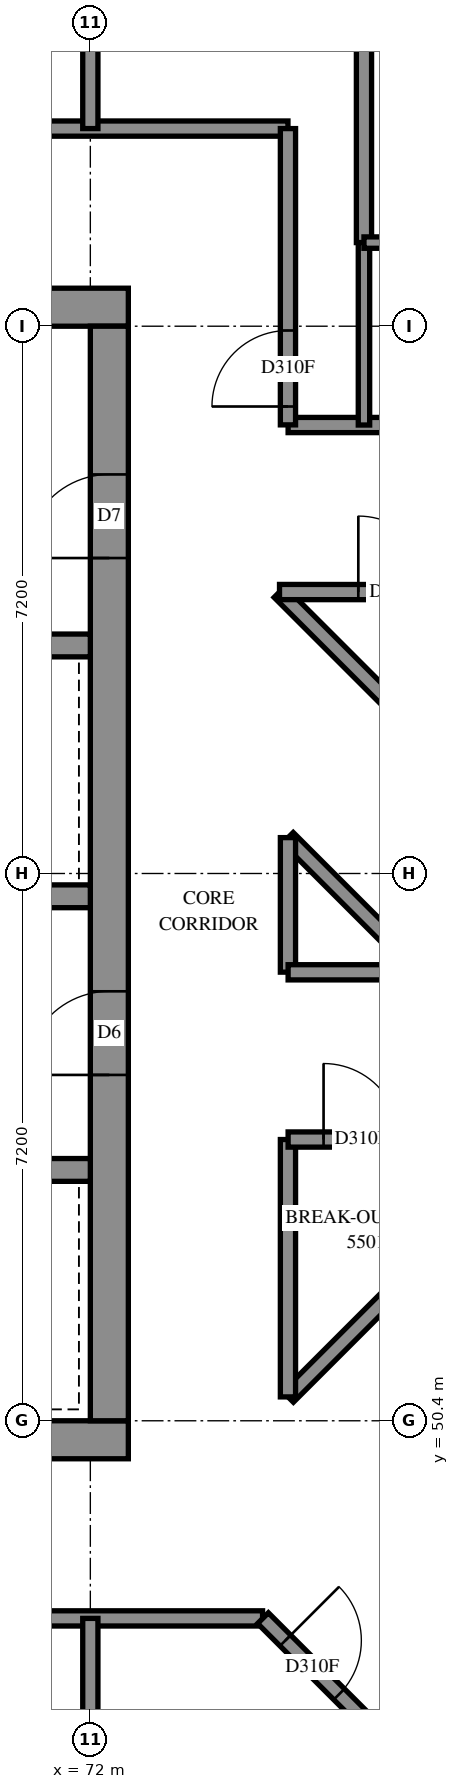
"""IFC4 building model, lengths in metres.
Left out: names, types, materials, properties, quantities, classifications, styles, units other than length and angle.
Written with IfcOpenShell. Run it as: python <this file> out.ifc"""

import sys

from ifc_helpers import new_model, si_unit, direction, frame, frame_2d, origin, place, context, subcontext, project, spatial, rectangle, extrude, element, fill, save


model = new_model("IFC4")
c1 = context("Model", 3, precision=1e-05, world=origin(), true_north=direction((0.0, 1.0)))
c2 = subcontext(c1, "Body", "Model", "MODEL_VIEW")
j1 = project(units=[si_unit("LENGTHUNIT", "METRE"), si_unit("PLANEANGLEUNIT", "RADIAN")], contexts=[c1])
p1 = place(None, origin())
s1 = spatial("IfcSite", under=j1, at=p1, CompositionType="ELEMENT")
p2 = place(p1, origin())
s2 = spatial("IfcBuilding", under=s1, at=p2, CompositionType="ELEMENT")
p3 = place(p2, frame((0.0, 0.0, 203.2)))
s3 = spatial("IfcBuildingStorey", under=s2, at=p3, CompositionType="ELEMENT", Elevation=203.2)
p4 = place(p3, frame((57.1, 50.15, -0.3), z_axis=(0.0, 0.0, 1.0), x_axis=(1.0, 0.0, 0.0)))
e1 = element("IfcWall", 1, at=p4, inside=s3, PredefinedType="SHEAR", context=c2, shape_type="SweptSolid", body=[
    extrude(rectangle(XDim=15.4, YDim=0.5, at=frame_2d((7.7, 0.0))), origin(), (0.0, 0.0, 1.0), 2.7),
])
p5 = place(p3, frame((57.1, 65.05, -0.3), z_axis=(0.0, 0.0, 1.0), x_axis=(1.0, 0.0, 0.0)))
e2 = element("IfcWall", 2, at=p5, inside=s3, PredefinedType="SHEAR", context=c2, shape_type="SweptSolid", body=[
    extrude(rectangle(XDim=15.4, YDim=0.5, at=frame_2d((7.7, 0.0))), origin(), (0.0, 0.0, 1.0), 2.7),
])
p6 = place(p5, frame((10.5, 0.0, 0.3)))
e3 = element("IfcOpeningElement", 3, at=p6, cuts=e2, PredefinedType="OPENING", context=c2, shape_type="SweptSolid", body=[
    extrude(rectangle(XDim=0.8, YDim=2.1, at=frame_2d((0.4, 1.05))), frame((0.0, 0.26, 0.0), z_axis=(0.0, -1.0, 0.0), x_axis=(1.0, 0.0, 0.0)), (0.0, 0.0, 1.0), 0.52),
])
p7 = place(p3, frame((72.25, 50.4, -0.3), z_axis=(0.0, 0.0, 1.0), x_axis=(0.0, 1.0, 0.0)))
e4 = element("IfcWall", 4, at=p7, inside=s3, PredefinedType="SHEAR", context=c2, shape_type="SweptSolid", body=[
    extrude(rectangle(XDim=14.4, YDim=0.5, at=frame_2d((7.2, 0.0))), origin(), (0.0, 0.0, 1.0), 2.7),
])
p8 = place(p7, frame((4.55, 0.0, 0.3)))
e5 = element("IfcOpeningElement", 5, at=p8, cuts=e4, PredefinedType="OPENING", context=c2, shape_type="SweptSolid", body=[
    extrude(rectangle(XDim=1.1, YDim=2.1, at=frame_2d((0.55, 1.05))), frame((0.0, 0.26, 0.0), z_axis=(0.0, -1.0, 0.0), x_axis=(1.0, 0.0, 0.0)), (0.0, 0.0, 1.0), 0.52),
])
p9 = place(p7, frame((11.35, 0.0, 0.3)))
e6 = element("IfcOpeningElement", 6, at=p9, cuts=e4, PredefinedType="OPENING", context=c2, shape_type="SweptSolid", body=[
    extrude(rectangle(XDim=1.1, YDim=2.1, at=frame_2d((0.55, 1.05))), frame((0.0, 0.26, 0.0), z_axis=(0.0, -1.0, 0.0), x_axis=(1.0, 0.0, 0.0)), (0.0, 0.0, 1.0), 0.52),
])
p10 = place(p3, frame((57.6, 53.7, 0.0), z_axis=(0.0, 0.0, 1.0), x_axis=(1.0, 0.0, 0.0)))
e7 = element("IfcWall", 7, at=p10, inside=s3, PredefinedType="SOLIDWALL", context=c2, shape_type="SweptSolid", body=[
    extrude(rectangle(XDim=14.4, YDim=0.3, at=frame_2d((7.2, 0.0))), origin(), (0.0, 0.0, 1.0), 3.1),
])
p11 = place(p10, frame((1.35, 0.0, 0.0)))
e8 = element("IfcOpeningElement", 8, at=p11, cuts=e7, PredefinedType="OPENING", context=c2, shape_type="SweptSolid", body=[
    extrude(rectangle(XDim=0.9, YDim=2.1, at=frame_2d((0.45, 1.05))), frame((0.0, 0.16, 0.0), z_axis=(0.0, -1.0, 0.0), x_axis=(1.0, 0.0, 0.0)), (0.0, 0.0, 1.0), 0.32),
])
p12 = place(p10, frame((4.95, 0.0, 0.0)))
e9 = element("IfcOpeningElement", 9, at=p12, cuts=e7, PredefinedType="OPENING", context=c2, shape_type="SweptSolid", body=[
    extrude(rectangle(XDim=0.9, YDim=2.1, at=frame_2d((0.45, 1.05))), frame((0.0, 0.16, 0.0), z_axis=(0.0, -1.0, 0.0), x_axis=(1.0, 0.0, 0.0)), (0.0, 0.0, 1.0), 0.32),
])
p13 = place(p10, frame((8.55, 0.0, 0.0)))
e10 = element("IfcOpeningElement", 10, at=p13, cuts=e7, PredefinedType="OPENING", context=c2, shape_type="SweptSolid", body=[
    extrude(rectangle(XDim=0.9, YDim=2.1, at=frame_2d((0.45, 1.05))), frame((0.0, 0.16, 0.0), z_axis=(0.0, -1.0, 0.0), x_axis=(1.0, 0.0, 0.0)), (0.0, 0.0, 1.0), 0.32),
])
p14 = place(p10, frame((12.05, 0.0, 0.0)))
e11 = element("IfcOpeningElement", 11, at=p14, cuts=e7, PredefinedType="OPENING", context=c2, shape_type="SweptSolid", body=[
    extrude(rectangle(XDim=1.1, YDim=2.1, at=frame_2d((0.55, 1.05))), frame((0.0, 0.16, 0.0), z_axis=(0.0, -1.0, 0.0), x_axis=(1.0, 0.0, 0.0)), (0.0, 0.0, 1.0), 0.32),
])
p15 = place(p3, frame((57.6, 57.3, 0.0), z_axis=(0.0, 0.0, 1.0), x_axis=(1.0, 0.0, 0.0)))
e12 = element("IfcWall", 12, at=p15, inside=s3, PredefinedType="SOLIDWALL", context=c2, shape_type="SweptSolid", body=[
    extrude(rectangle(XDim=14.4, YDim=0.3, at=frame_2d((7.2, 0.0))), origin(), (0.0, 0.0, 1.0), 3.1),
])
p16 = place(p15, frame((1.25, 0.0, 0.0)))
e13 = element("IfcOpeningElement", 13, at=p16, cuts=e12, PredefinedType="OPENING", context=c2, shape_type="SweptSolid", body=[
    extrude(rectangle(XDim=1.1, YDim=2.1, at=frame_2d((0.55, 1.05))), frame((0.0, 0.16, 0.0), z_axis=(0.0, -1.0, 0.0), x_axis=(1.0, 0.0, 0.0)), (0.0, 0.0, 1.0), 0.32),
])
p17 = place(p15, frame((4.85, 0.0, 0.0)))
e14 = element("IfcOpeningElement", 14, at=p17, cuts=e12, PredefinedType="OPENING", context=c2, shape_type="SweptSolid", body=[
    extrude(rectangle(XDim=1.1, YDim=2.1, at=frame_2d((0.55, 1.05))), frame((0.0, 0.16, 0.0), z_axis=(0.0, -1.0, 0.0), x_axis=(1.0, 0.0, 0.0)), (0.0, 0.0, 1.0), 0.32),
])
p18 = place(p15, frame((8.45, 0.0, 0.0)))
e15 = element("IfcOpeningElement", 15, at=p18, cuts=e12, PredefinedType="OPENING", context=c2, shape_type="SweptSolid", body=[
    extrude(rectangle(XDim=1.1, YDim=2.1, at=frame_2d((0.55, 1.05))), frame((0.0, 0.16, 0.0), z_axis=(0.0, -1.0, 0.0), x_axis=(1.0, 0.0, 0.0)), (0.0, 0.0, 1.0), 0.32),
])
p19 = place(p15, frame((12.05, 0.0, 0.0)))
e16 = element("IfcOpeningElement", 16, at=p19, cuts=e12, PredefinedType="OPENING", context=c2, shape_type="SweptSolid", body=[
    extrude(rectangle(XDim=1.1, YDim=2.1, at=frame_2d((0.55, 1.05))), frame((0.0, 0.16, 0.0), z_axis=(0.0, -1.0, 0.0), x_axis=(1.0, 0.0, 0.0)), (0.0, 0.0, 1.0), 0.32),
])
p20 = place(p3, frame((64.8, 60.6, 0.0), z_axis=(0.0, 0.0, 1.0), x_axis=(1.0, 0.0, 0.0)))
e17 = element("IfcWall", 17, at=p20, inside=s3, PredefinedType="SOLIDWALL", context=c2, shape_type="SweptSolid", body=[
    extrude(rectangle(XDim=7.2, YDim=0.3, at=frame_2d((3.6, 0.0))), origin(), (0.0, 0.0, 1.0), 3.1),
])
p21 = place(p3, frame((55.0, 67.4, 0.0), z_axis=(0.0, 0.0, 1.0), x_axis=(1.0, 0.0, 0.0)))
e18 = element("IfcWall", 18, at=p21, inside=s3, PredefinedType="PARTITIONING", context=c2, shape_type="SweptSolid", body=[
    extrude(rectangle(XDim=19.6, YDim=0.2, at=frame_2d((9.8, 0.0))), origin(), (0.0, 0.0, 1.0), 3.1),
])
p22 = place(p21, frame((6.499, 0.0, 0.0)))
e19 = element("IfcOpeningElement", 19, at=p22, cuts=e18, PredefinedType="OPENING", context=c2, shape_type="SweptSolid", body=[
    extrude(rectangle(XDim=0.9, YDim=2.1, at=frame_2d((0.45, 1.05))), frame((0.0, 0.11, 0.0), z_axis=(0.0, -1.0, 0.0), x_axis=(1.0, 0.0, 0.0)), (0.0, 0.0, 1.0), 0.22),
])
p23 = place(p21, frame((14.001, 0.0, 0.0)))
e20 = element("IfcOpeningElement", 20, at=p23, cuts=e18, PredefinedType="OPENING", context=c2, shape_type="SweptSolid", body=[
    extrude(rectangle(XDim=0.9, YDim=2.1, at=frame_2d((0.45, 1.05))), frame((0.0, 0.11, 0.0), z_axis=(0.0, -1.0, 0.0), x_axis=(1.0, 0.0, 0.0)), (0.0, 0.0, 1.0), 0.22),
])
p24 = place(p3, frame((55.0, 47.8, 0.0), z_axis=(0.0, 0.0, 1.0), x_axis=(1.0, 0.0, 0.0)))
e21 = element("IfcWall", 21, at=p24, inside=s3, PredefinedType="PARTITIONING", context=c2, shape_type="SweptSolid", body=[
    extrude(rectangle(XDim=19.266, YDim=0.2, at=frame_2d((9.633, 0.0))), origin(), (0.0, 0.0, 1.0), 3.1),
])
p25 = place(p24, frame((4.9, 0.0, 0.0)))
e22 = element("IfcOpeningElement", 22, at=p25, cuts=e21, PredefinedType="OPENING", context=c2, shape_type="SweptSolid", body=[
    extrude(rectangle(XDim=0.9, YDim=2.1, at=frame_2d((0.45, 1.05))), frame((0.0, 0.11, 0.0), z_axis=(0.0, -1.0, 0.0), x_axis=(1.0, 0.0, 0.0)), (0.0, 0.0, 1.0), 0.22),
])
p26 = place(p24, frame((6.6, 0.0, 0.0)))
e23 = element("IfcOpeningElement", 23, at=p26, cuts=e21, PredefinedType="OPENING", context=c2, shape_type="SweptSolid", body=[
    extrude(rectangle(XDim=0.9, YDim=2.1, at=frame_2d((0.45, 1.05))), frame((0.0, 0.11, 0.0), z_axis=(0.0, -1.0, 0.0), x_axis=(1.0, 0.0, 0.0)), (0.0, 0.0, 1.0), 0.22),
])
p27 = place(p24, frame((13.743, 0.0, 0.0)))
e24 = element("IfcOpeningElement", 24, at=p27, cuts=e21, PredefinedType="OPENING", context=c2, shape_type="SweptSolid", body=[
    extrude(rectangle(XDim=0.9, YDim=2.1, at=frame_2d((0.45, 1.05))), frame((0.0, 0.11, 0.0), z_axis=(0.0, -1.0, 0.0), x_axis=(1.0, 0.0, 0.0)), (0.0, 0.0, 1.0), 0.22),
])
p28 = place(p3, frame((75.6, 65.9, 0.0), z_axis=(0.0, 0.0, 1.0), x_axis=(0.0, 1.0, 0.0)))
e25 = element("IfcWall", 25, at=p28, inside=s3, PredefinedType="PARTITIONING", context=c2, shape_type="SweptSolid", body=[
    extrude(rectangle(XDim=6.877, YDim=0.2, at=frame_2d((3.439, 0.0))), origin(), (0.0, 0.0, 1.0), 3.1),
])
p29 = place(p3, frame((74.489, 61.303, 0.0), z_axis=(0.0, 0.0, 1.0), x_axis=(0.7071892763, -0.7070242765, 0.0)))
e26 = element("IfcWall", 26, at=p29, inside=s3, PredefinedType="PARTITIONING", context=c2, shape_type="SweptSolid", body=[
    extrude(rectangle(XDim=6.667, YDim=0.2, at=frame_2d((3.333, 0.0))), origin(), (0.0, 0.0, 1.0), 3.1),
])
p30 = place(p3, frame((74.601, 50.715, 0.0), z_axis=(0.0, 0.0, 1.0), x_axis=(0.7071067812, 0.7071067812, 0.0)))
e27 = element("IfcWall", 27, at=p30, inside=s3, PredefinedType="PARTITIONING", context=c2, shape_type="SweptSolid", body=[
    extrude(rectangle(XDim=4.786, YDim=0.2, at=frame_2d((2.393, 0.0))), origin(), (0.0, 0.0, 1.0), 3.1),
])
p31 = place(p3, frame((74.489, 61.303, 0.0), z_axis=(0.0, 0.0, 1.0), x_axis=(0.9999998105, -0.0006155543, 0.0)))
e28 = element("IfcWall", 28, at=p31, inside=s3, PredefinedType="PARTITIONING", context=c2, shape_type="SweptSolid", body=[
    extrude(rectangle(XDim=4.711, YDim=0.2, at=frame_2d((2.356, 0.0))), origin(), (0.0, 0.0, 1.0), 3.1),
])
p32 = place(p31, frame((1.037, 0.0, 0.0)))
e29 = element("IfcOpeningElement", 29, at=p32, cuts=e28, PredefinedType="OPENING", context=c2, shape_type="SweptSolid", body=[
    extrude(rectangle(XDim=1.0, YDim=2.1, at=frame_2d((0.5, 1.05))), frame((0.0, 0.11, 0.0), z_axis=(0.0, -1.0, 0.0), x_axis=(1.0, 0.0, 0.0)), (0.0, 0.0, 1.0), 0.22),
])
p33 = place(p3, frame((74.272, 47.803, 0.0), z_axis=(0.0, 0.0, 1.0), x_axis=(0.7071067812, -0.7071067812, 0.0)))
e30 = element("IfcWall", 30, at=p33, inside=s3, PredefinedType="PARTITIONING", context=c2, shape_type="SweptSolid", body=[
    extrude(rectangle(XDim=4.641, YDim=0.2, at=frame_2d((2.321, 0.0))), origin(), (0.0, 0.0, 1.0), 3.1),
])
p34 = place(p33, frame((0.416, 0.0, 0.0)))
e31 = element("IfcOpeningElement", 31, at=p34, cuts=e30, PredefinedType="OPENING", context=c2, shape_type="SweptSolid", body=[
    extrude(rectangle(XDim=1.0, YDim=2.1, at=frame_2d((0.5, 1.05))), frame((0.0, 0.11, 0.0), z_axis=(0.0, -1.0, 0.0), x_axis=(1.0, 0.0, 0.0)), (0.0, 0.0, 1.0), 0.22),
])
p35 = place(p3, frame((74.602, 63.5, 0.0), z_axis=(0.0, 0.0, 1.0), x_axis=(1.0, 0.0, 0.0)))
e32 = element("IfcWall", 32, at=p35, inside=s3, PredefinedType="PARTITIONING", context=c2, shape_type="SweptSolid", body=[
    extrude(rectangle(XDim=4.598, YDim=0.2, at=frame_2d((2.299, 0.0))), origin(), (0.0, 0.0, 1.0), 3.1),
])
p36 = place(p35, frame((3.298, 0.0, 0.0)))
e33 = element("IfcOpeningElement", 33, at=p36, cuts=e32, PredefinedType="OPENING", context=c2, shape_type="SweptSolid", body=[
    extrude(rectangle(XDim=0.9, YDim=2.1, at=frame_2d((0.45, 1.05))), frame((0.0, 0.11, 0.0), z_axis=(0.0, -1.0, 0.0), x_axis=(1.0, 0.0, 0.0)), (0.0, 0.0, 1.0), 0.22),
])
p37 = place(p3, frame((72.0, 43.6, 0.0), z_axis=(0.0, 0.0, 1.0), x_axis=(0.0, 1.0, 0.0)))
e34 = element("IfcWall", 34, at=p37, inside=s3, PredefinedType="PARTITIONING", context=c2, shape_type="SweptSolid", body=[
    extrude(rectangle(XDim=4.2, YDim=0.2, at=frame_2d((2.1, 0.0))), origin(), (0.0, 0.0, 1.0), 3.1),
])
p38 = place(p3, frame((72.0, 67.4, 0.0), z_axis=(0.0, 0.0, 1.0), x_axis=(0.0, 1.0, 0.0)))
e35 = element("IfcWall", 35, at=p38, inside=s3, PredefinedType="PARTITIONING", context=c2, shape_type="SweptSolid", body=[
    extrude(rectangle(XDim=4.096, YDim=0.2, at=frame_2d((2.048, 0.0))), origin(), (0.0, 0.0, 1.0), 3.1),
])
p39 = place(p3, frame((74.6, 63.502, 0.0), z_axis=(0.0, 0.0, 1.0), x_axis=(0.0, 1.0, 0.0)))
e36 = element("IfcWall", 36, at=p39, inside=s3, PredefinedType="PARTITIONING", context=c2, shape_type="SweptSolid", body=[
    extrude(rectangle(XDim=3.898, YDim=0.2, at=frame_2d((1.949, 0.0))), origin(), (0.0, 0.0, 1.0), 3.1),
])
p40 = place(p39, frame((0.242, 0.0, 0.0)))
e37 = element("IfcOpeningElement", 37, at=p40, cuts=e36, PredefinedType="OPENING", context=c2, shape_type="SweptSolid", body=[
    extrude(rectangle(XDim=1.0, YDim=2.1, at=frame_2d((0.5, 1.05))), frame((0.0, 0.11, 0.0), z_axis=(0.0, -1.0, 0.0), x_axis=(1.0, 0.0, 0.0)), (0.0, 0.0, 1.0), 0.22),
])
p41 = place(p3, frame((74.6, 50.714, 0.0), z_axis=(0.0, 0.0, 1.0), x_axis=(0.0, 1.0, 0.0)))
e38 = element("IfcWall", 38, at=p41, inside=s3, PredefinedType="PARTITIONING", context=c2, shape_type="SweptSolid", body=[
    extrude(rectangle(XDim=3.386, YDim=0.2, at=frame_2d((1.693, 0.0))), origin(), (0.0, 0.0, 1.0), 3.1),
])
p42 = place(p3, frame((74.602, 54.1, 0.0), z_axis=(0.0, 0.0, 1.0), x_axis=(1.0, 0.0, 0.0)))
e39 = element("IfcWall", 39, at=p42, inside=s3, PredefinedType="PARTITIONING", context=c2, shape_type="SweptSolid", body=[
    extrude(rectangle(XDim=3.384, YDim=0.2, at=frame_2d((1.692, 0.0))), origin(), (0.0, 0.0, 1.0), 3.1),
])
p43 = place(p42, frame((0.467, 0.0, 0.0)))
e40 = element("IfcOpeningElement", 40, at=p43, cuts=e39, PredefinedType="OPENING", context=c2, shape_type="SweptSolid", body=[
    extrude(rectangle(XDim=1.0, YDim=2.1, at=frame_2d((0.5, 1.05))), frame((0.0, 0.11, 0.0), z_axis=(0.0, -1.0, 0.0), x_axis=(1.0, 0.0, 0.0)), (0.0, 0.0, 1.0), 0.22),
])
p44 = place(p3, frame((74.599, 58.069, 0.0), z_axis=(0.0, 0.0, 1.0), x_axis=(0.7071067812, -0.7071067812, 0.0)))
e41 = element("IfcWall", 41, at=p44, inside=s3, PredefinedType="PARTITIONING", context=c2, shape_type="SweptSolid", body=[
    extrude(rectangle(XDim=2.503, YDim=0.2, at=frame_2d((1.252, 0.0))), origin(), (0.0, 0.0, 1.0), 3.1),
])
p45 = place(p3, frame((75.6, 63.5, 0.0), z_axis=(0.0, 0.0, 1.0), x_axis=(0.0, 1.0, 0.0)))
e42 = element("IfcWall", 42, at=p45, inside=s3, PredefinedType="PARTITIONING", context=c2, shape_type="SweptSolid", body=[
    extrude(rectangle(XDim=2.4, YDim=0.15, at=frame_2d((1.2, 0.0))), origin(), (0.0, 0.0, 1.0), 3.1),
])
p46 = place(p3, frame((75.6, 65.9, 0.0), z_axis=(0.0, 0.0, 1.0), x_axis=(1.0, 0.0, 0.0)))
e43 = element("IfcWall", 43, at=p46, inside=s3, PredefinedType="PARTITIONING", context=c2, shape_type="SweptSolid", body=[
    extrude(rectangle(XDim=1.9, YDim=0.15, at=frame_2d((0.95, 0.0))), origin(), (0.0, 0.0, 1.0), 3.1),
])
p47 = place(p46, frame((0.502, 0.0, 0.0)))
e44 = element("IfcOpeningElement", 44, at=p47, cuts=e43, PredefinedType="OPENING", context=c2, shape_type="SweptSolid", body=[
    extrude(rectangle(XDim=0.8, YDim=2.1, at=frame_2d((0.4, 1.05))), frame((0.0, 0.085, 0.0), z_axis=(0.0, -1.0, 0.0), x_axis=(1.0, 0.0, 0.0)), (0.0, 0.0, 1.0), 0.17),
])
for number, where, z_axis, x_axis in (
    (45, (74.6, 56.302, 0.0), (0.0, 0.0, 1.0), (0.0, 1.0, 0.0)),
    (46, (74.602, 56.3, 0.0), (0.0, 0.0, 1.0), (1.0, 0.0, 0.0)),
):
    element("IfcWall", number, at=place(p3, frame(where, z_axis=z_axis, x_axis=x_axis)), inside=s3, PredefinedType="PARTITIONING", context=c2, shape_type="SweptSolid", body=[
        extrude(rectangle(XDim=1.77, YDim=0.2, at=frame_2d((0.885, 0.0))), origin(), (0.0, 0.0, 1.0), 3.1),
    ])
p48 = place(p8, origin())
e47 = element("IfcDoor", 47, at=p48, inside=s3, OperationType="DOUBLE_DOOR_SINGLE_SWING", PredefinedType="DOOR", context=c2, shape_type="SweptSolid", body=[
    extrude(rectangle(XDim=1.1, YDim=2.1, at=frame_2d((0.55, 1.05))), frame((0.0, 0.025, 0.0), z_axis=(0.0, -1.0, 0.0), x_axis=(1.0, 0.0, 0.0)), (0.0, 0.0, 1.0), 0.05),
])
fill(e5, e47)
p49 = place(p9, origin())
e48 = element("IfcDoor", 48, at=p49, inside=s3, OperationType="SINGLE_SWING_RIGHT", PredefinedType="DOOR", context=c2, shape_type="SweptSolid", body=[
    extrude(rectangle(XDim=1.1, YDim=2.1, at=frame_2d((0.55, 1.05))), frame((0.0, 0.025, 0.0), z_axis=(0.0, -1.0, 0.0), x_axis=(1.0, 0.0, 0.0)), (0.0, 0.0, 1.0), 0.05),
])
fill(e6, e48)
p50 = place(p43, origin())
e49 = element("IfcDoor", 49, at=p50, inside=s3, OperationType="SINGLE_SWING_RIGHT", PredefinedType="DOOR", context=c2, shape_type="SweptSolid", body=[
    extrude(rectangle(XDim=1.0, YDim=2.1, at=frame_2d((0.5, 1.05))), frame((0.0, 0.025, 0.0), z_axis=(0.0, -1.0, 0.0), x_axis=(1.0, 0.0, 0.0)), (0.0, 0.0, 1.0), 0.05),
])
fill(e40, e49)
p51 = place(p40, origin())
e50 = element("IfcDoor", 50, at=p51, inside=s3, OperationType="SINGLE_SWING_RIGHT", PredefinedType="DOOR", context=c2, shape_type="SweptSolid", body=[
    extrude(rectangle(XDim=1.0, YDim=2.1, at=frame_2d((0.5, 1.05))), frame((0.0, 0.025, 0.0), z_axis=(0.0, -1.0, 0.0), x_axis=(1.0, 0.0, 0.0)), (0.0, 0.0, 1.0), 0.05),
])
fill(e37, e50)
p52 = place(p32, origin())
e51 = element("IfcDoor", 51, at=p52, inside=s3, OperationType="SINGLE_SWING_RIGHT", PredefinedType="DOOR", context=c2, shape_type="SweptSolid", body=[
    extrude(rectangle(XDim=1.0, YDim=2.1, at=frame_2d((0.5, 1.05))), frame((0.0, 0.025, 0.0), z_axis=(0.0, -1.0, 0.0), x_axis=(1.0, 0.0, 0.0)), (0.0, 0.0, 1.0), 0.05),
])
fill(e29, e51)
p53 = place(p34, origin())
e52 = element("IfcDoor", 52, at=p53, inside=s3, OperationType="SINGLE_SWING_LEFT", PredefinedType="DOOR", context=c2, shape_type="SweptSolid", body=[
    extrude(rectangle(XDim=1.0, YDim=2.1, at=frame_2d((0.5, 1.05))), frame((0.0, 0.025, 0.0), z_axis=(0.0, -1.0, 0.0), x_axis=(1.0, 0.0, 0.0)), (0.0, 0.0, 1.0), 0.05),
])
fill(e31, e52)
save(model, sys.argv[1])
